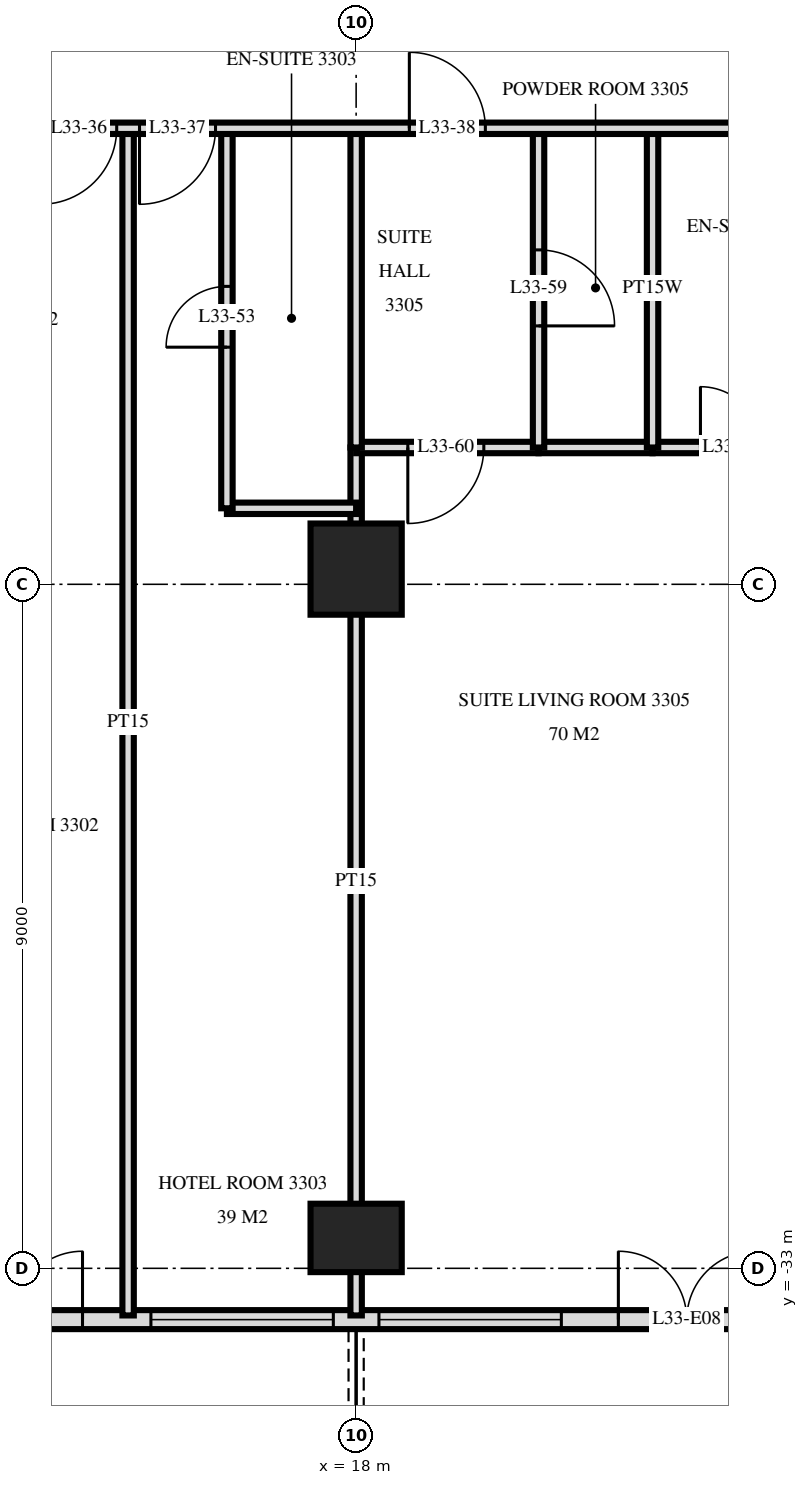
"""IFC4 building model, lengths in metres.
Left out: names, types, materials, properties, quantities, classifications, styles, units other than length and angle.
Written with IfcOpenShell. Run it as: python <this file> out.ifc"""

import sys

from ifc_helpers import new_model, si_unit, direction, frame, frame_2d, origin, origin_2d, place, context, subcontext, project, spatial, rectangle, extrude, element, fill, save


model = new_model("IFC4")
c1 = context("Model", 3, precision=1e-05, world=origin(), true_north=direction((0.0, 1.0)))
c2 = subcontext(c1, "Body", "Model", "MODEL_VIEW")
j1 = project(units=[si_unit("LENGTHUNIT", "METRE"), si_unit("PLANEANGLEUNIT", "RADIAN")], contexts=[c1])
p1 = place(None, origin())
s1 = spatial("IfcSite", under=j1, at=p1, CompositionType="ELEMENT")
p2 = place(p1, origin())
s2 = spatial("IfcBuilding", under=s1, at=p2, CompositionType="ELEMENT")
p3 = place(p2, frame((0.0, 0.0, 130.8)))
s3 = spatial("IfcBuildingStorey", under=s2, at=p3, CompositionType="ELEMENT", Elevation=130.8)
p4 = place(p3, frame((18.0, -32.6, 0.0), z_axis=(0.0, 0.0, 1.0), x_axis=(1.0, 0.0, 0.0)))
e1 = element("IfcColumn", 1, at=p4, inside=s3, PredefinedType="COLUMN", context=c2, shape_type="SweptSolid", body=[
    extrude(rectangle(XDim=1.2, YDim=0.9, at=origin_2d()), origin(), (0.0, 0.0, 1.0), 3.6),
])
p5 = place(p3, frame((18.0, -23.8, 0.0), z_axis=(0.0, 0.0, 1.0), x_axis=(1.0, 0.0, 0.0)))
e2 = element("IfcColumn", 2, at=p5, inside=s3, PredefinedType="COLUMN", context=c2, shape_type="SweptSolid", body=[
    extrude(rectangle(XDim=1.2, YDim=1.2, at=origin_2d()), origin(), (0.0, 0.0, 1.0), 3.6),
])
p6 = place(p3, frame((-23.675, -33.675, 0.0), z_axis=(0.0, 0.0, 1.0), x_axis=(1.0, 0.0, 0.0)))
e3 = element("IfcWall", 3, at=p6, inside=s3, PredefinedType="SOLIDWALL", context=c2, shape_type="SweptSolid", body=[
    extrude(rectangle(XDim=47.351, YDim=0.25, at=frame_2d((23.675, 0.0))), origin(), (0.0, 0.0, 1.0), 3.32),
])
p7 = place(p6, frame((3.425, 0.0, 0.0)))
e4 = element("IfcOpeningElement", 4, at=p7, cuts=e3, PredefinedType="OPENING", context=c2, shape_type="SweptSolid", body=[
    extrude(rectangle(XDim=1.8, YDim=2.4, at=frame_2d((0.9, 1.2))), frame((0.0, 0.135, 0.0), z_axis=(0.0, -1.0, 0.0), x_axis=(1.0, 0.0, 0.0)), (0.0, 0.0, 1.0), 0.27),
])
p8 = place(p6, frame((6.275, 0.0, 0.0)))
e5 = element("IfcOpeningElement", 5, at=p8, cuts=e3, PredefinedType="OPENING", context=c2, shape_type="SweptSolid", body=[
    extrude(rectangle(XDim=1.8, YDim=2.4, at=frame_2d((0.9, 1.2))), frame((0.0, 0.135, 0.0), z_axis=(0.0, -1.0, 0.0), x_axis=(1.0, 0.0, 0.0)), (0.0, 0.0, 1.0), 0.27),
])
p9 = place(p6, frame((8.975, 0.0, 0.3)))
e6 = element("IfcOpeningElement", 6, at=p9, cuts=e3, PredefinedType="OPENING", context=c2, shape_type="SweptSolid", body=[
    extrude(rectangle(XDim=2.4, YDim=2.1, at=frame_2d((1.2, 1.05))), frame((0.0, 0.135, 0.0), z_axis=(0.0, -1.0, 0.0), x_axis=(1.0, 0.0, 0.0)), (0.0, 0.0, 1.0), 0.27),
])
p10 = place(p6, frame((12.275, 0.0, 0.0)))
e7 = element("IfcOpeningElement", 7, at=p10, cuts=e3, PredefinedType="OPENING", context=c2, shape_type="SweptSolid", body=[
    extrude(rectangle(XDim=1.8, YDim=2.4, at=frame_2d((0.9, 1.2))), frame((0.0, 0.135, 0.0), z_axis=(0.0, -1.0, 0.0), x_axis=(1.0, 0.0, 0.0)), (0.0, 0.0, 1.0), 0.27),
])
p11 = place(p6, frame((14.975, 0.0, 0.3)))
e8 = element("IfcOpeningElement", 8, at=p11, cuts=e3, PredefinedType="OPENING", context=c2, shape_type="SweptSolid", body=[
    extrude(rectangle(XDim=2.4, YDim=2.1, at=frame_2d((1.2, 1.05))), frame((0.0, 0.135, 0.0), z_axis=(0.0, -1.0, 0.0), x_axis=(1.0, 0.0, 0.0)), (0.0, 0.0, 1.0), 0.27),
])
p12 = place(p6, frame((17.975, 0.0, 0.3)))
e9 = element("IfcOpeningElement", 9, at=p12, cuts=e3, PredefinedType="OPENING", context=c2, shape_type="SweptSolid", body=[
    extrude(rectangle(XDim=2.4, YDim=2.1, at=frame_2d((1.2, 1.05))), frame((0.0, 0.135, 0.0), z_axis=(0.0, -1.0, 0.0), x_axis=(1.0, 0.0, 0.0)), (0.0, 0.0, 1.0), 0.27),
])
p13 = place(p6, frame((21.275, 0.0, 0.0)))
e10 = element("IfcOpeningElement", 10, at=p13, cuts=e3, PredefinedType="OPENING", context=c2, shape_type="SweptSolid", body=[
    extrude(rectangle(XDim=1.8, YDim=2.4, at=frame_2d((0.9, 1.2))), frame((0.0, 0.135, 0.0), z_axis=(0.0, -1.0, 0.0), x_axis=(1.0, 0.0, 0.0)), (0.0, 0.0, 1.0), 0.27),
])
p14 = place(p6, frame((24.275, 0.0, 0.0)))
e11 = element("IfcOpeningElement", 11, at=p14, cuts=e3, PredefinedType="OPENING", context=c2, shape_type="SweptSolid", body=[
    extrude(rectangle(XDim=1.8, YDim=2.4, at=frame_2d((0.9, 1.2))), frame((0.0, 0.135, 0.0), z_axis=(0.0, -1.0, 0.0), x_axis=(1.0, 0.0, 0.0)), (0.0, 0.0, 1.0), 0.27),
])
p15 = place(p6, frame((26.975, 0.0, 0.3)))
e12 = element("IfcOpeningElement", 12, at=p15, cuts=e3, PredefinedType="OPENING", context=c2, shape_type="SweptSolid", body=[
    extrude(rectangle(XDim=2.4, YDim=2.1, at=frame_2d((1.2, 1.05))), frame((0.0, 0.135, 0.0), z_axis=(0.0, -1.0, 0.0), x_axis=(1.0, 0.0, 0.0)), (0.0, 0.0, 1.0), 0.27),
])
p16 = place(p6, frame((30.275, 0.0, 0.0)))
e13 = element("IfcOpeningElement", 13, at=p16, cuts=e3, PredefinedType="OPENING", context=c2, shape_type="SweptSolid", body=[
    extrude(rectangle(XDim=1.8, YDim=2.4, at=frame_2d((0.9, 1.2))), frame((0.0, 0.135, 0.0), z_axis=(0.0, -1.0, 0.0), x_axis=(1.0, 0.0, 0.0)), (0.0, 0.0, 1.0), 0.27),
])
p17 = place(p6, frame((32.975, 0.0, 0.3)))
e14 = element("IfcOpeningElement", 14, at=p17, cuts=e3, PredefinedType="OPENING", context=c2, shape_type="SweptSolid", body=[
    extrude(rectangle(XDim=2.4, YDim=2.1, at=frame_2d((1.2, 1.05))), frame((0.0, 0.135, 0.0), z_axis=(0.0, -1.0, 0.0), x_axis=(1.0, 0.0, 0.0)), (0.0, 0.0, 1.0), 0.27),
])
p18 = place(p6, frame((36.275, 0.0, 0.0)))
e15 = element("IfcOpeningElement", 15, at=p18, cuts=e3, PredefinedType="OPENING", context=c2, shape_type="SweptSolid", body=[
    extrude(rectangle(XDim=1.8, YDim=2.4, at=frame_2d((0.9, 1.2))), frame((0.0, 0.135, 0.0), z_axis=(0.0, -1.0, 0.0), x_axis=(1.0, 0.0, 0.0)), (0.0, 0.0, 1.0), 0.27),
])
p19 = place(p6, frame((38.975, 0.0, 0.3)))
e16 = element("IfcOpeningElement", 16, at=p19, cuts=e3, PredefinedType="OPENING", context=c2, shape_type="SweptSolid", body=[
    extrude(rectangle(XDim=2.4, YDim=2.1, at=frame_2d((1.2, 1.05))), frame((0.0, 0.135, 0.0), z_axis=(0.0, -1.0, 0.0), x_axis=(1.0, 0.0, 0.0)), (0.0, 0.0, 1.0), 0.27),
])
p20 = place(p6, frame((41.975, 0.0, 0.3)))
e17 = element("IfcOpeningElement", 17, at=p20, cuts=e3, PredefinedType="OPENING", context=c2, shape_type="SweptSolid", body=[
    extrude(rectangle(XDim=2.4, YDim=2.1, at=frame_2d((1.2, 1.05))), frame((0.0, 0.135, 0.0), z_axis=(0.0, -1.0, 0.0), x_axis=(1.0, 0.0, 0.0)), (0.0, 0.0, 1.0), 0.27),
])
p21 = place(p6, frame((45.125, 0.0, 0.0)))
e18 = element("IfcOpeningElement", 18, at=p21, cuts=e3, PredefinedType="OPENING", context=c2, shape_type="SweptSolid", body=[
    extrude(rectangle(XDim=1.8, YDim=2.4, at=frame_2d((0.9, 1.2))), frame((0.0, 0.135, 0.0), z_axis=(0.0, -1.0, 0.0), x_axis=(1.0, 0.0, 0.0)), (0.0, 0.0, 1.0), 0.27),
])
p22 = place(p3, frame((21.9, -22.2, 0.0), z_axis=(0.0, 0.0, 1.0), x_axis=(0.0, 1.0, 0.0)))
e19 = element("IfcWall", 19, at=p22, inside=s3, PredefinedType="PLUMBINGWALL", context=c2, shape_type="SweptSolid", body=[
    extrude(rectangle(XDim=4.2, YDim=0.15, at=frame_2d((2.1, 0.0))), origin(), (0.0, 0.0, 1.0), 3.32),
])
p23 = place(p3, frame((20.4, -22.2, 0.0), z_axis=(0.0, 0.0, 1.0), x_axis=(0.0, 1.0, 0.0)))
e20 = element("IfcWall", 20, at=p23, inside=s3, PredefinedType="PARTITIONING", context=c2, shape_type="SweptSolid", body=[
    extrude(rectangle(XDim=4.2, YDim=0.15, at=frame_2d((2.1, 0.0))), origin(), (0.0, 0.0, 1.0), 3.32),
])
p24 = place(p23, frame((1.6, 0.0, 0.0)))
e21 = element("IfcOpeningElement", 21, at=p24, cuts=e20, PredefinedType="OPENING", context=c2, shape_type="SweptSolid", body=[
    extrude(rectangle(XDim=1.0, YDim=2.1, at=frame_2d((0.5, 1.05))), frame((0.0, 0.085, 0.0), z_axis=(0.0, -1.0, 0.0), x_axis=(1.0, 0.0, 0.0)), (0.0, 0.0, 1.0), 0.17),
])
p25 = place(p3, frame((18.0, -22.2, 0.0), z_axis=(0.0, 0.0, 1.0), x_axis=(0.0, 1.0, 0.0)))
e22 = element("IfcWall", 22, at=p25, inside=s3, PredefinedType="PARTITIONING", context=c2, shape_type="SweptSolid", body=[
    extrude(rectangle(XDim=4.2, YDim=0.15, at=frame_2d((2.1, 0.0))), origin(), (0.0, 0.0, 1.0), 3.32),
])
p26 = place(p3, frame((18.0, -33.62, 0.0), z_axis=(0.0, 0.0, 1.0), x_axis=(0.0, 1.0, 0.0)))
e23 = element("IfcWall", 23, at=p26, inside=s3, PredefinedType="PARTITIONING", context=c2, shape_type="SweptSolid", body=[
    extrude(rectangle(XDim=11.42, YDim=0.15, at=frame_2d((5.71, 0.0))), origin(), (0.0, 0.0, 1.0), 3.32),
])
p27 = place(p3, frame((16.3, -23.0, 0.0), z_axis=(0.0, 0.0, 1.0), x_axis=(0.0, 1.0, 0.0)))
e24 = element("IfcWall", 24, at=p27, inside=s3, PredefinedType="PARTITIONING", context=c2, shape_type="SweptSolid", body=[
    extrude(rectangle(XDim=5.0, YDim=0.15, at=frame_2d((2.5, 0.0))), origin(), (0.0, 0.0, 1.0), 3.32),
])
p28 = place(p27, frame((2.12, 0.0, 0.0)))
e25 = element("IfcOpeningElement", 25, at=p28, cuts=e24, PredefinedType="OPENING", context=c2, shape_type="SweptSolid", body=[
    extrude(rectangle(XDim=0.8, YDim=2.1, at=frame_2d((0.4, 1.05))), frame((0.0, 0.085, 0.0), z_axis=(0.0, -1.0, 0.0), x_axis=(1.0, 0.0, 0.0)), (0.0, 0.0, 1.0), 0.17),
])
p29 = place(p3, frame((15.0, -33.62, 0.0), z_axis=(0.0, 0.0, 1.0), x_axis=(0.0, 1.0, 0.0)))
e26 = element("IfcWall", 26, at=p29, inside=s3, PredefinedType="PARTITIONING", context=c2, shape_type="SweptSolid", body=[
    extrude(rectangle(XDim=15.62, YDim=0.15, at=frame_2d((7.81, 0.0))), origin(), (0.0, 0.0, 1.0), 3.32),
])
p30 = place(p3, frame((16.3, -23.0, 0.0), z_axis=(0.0, 0.0, 1.0), x_axis=(1.0, 0.0, 0.0)))
e27 = element("IfcWall", 27, at=p30, inside=s3, PredefinedType="PARTITIONING", context=c2, shape_type="SweptSolid", body=[
    extrude(rectangle(XDim=1.7, YDim=0.15, at=frame_2d((0.85, 0.0))), origin(), (0.0, 0.0, 1.0), 3.32),
])
p31 = place(p3, frame((18.0, -22.2, 0.0), z_axis=(0.0, 0.0, 1.0), x_axis=(1.0, 0.0, 0.0)))
e28 = element("IfcWall", 28, at=p31, inside=s3, PredefinedType="PARTITIONING", context=c2, shape_type="SweptSolid", body=[
    extrude(rectangle(XDim=2.4, YDim=0.15, at=frame_2d((1.2, 0.0))), origin(), (0.0, 0.0, 1.0), 3.32),
])
p32 = place(p31, frame((0.68, 0.0, 0.0)))
e29 = element("IfcOpeningElement", 29, at=p32, cuts=e28, PredefinedType="OPENING", context=c2, shape_type="SweptSolid", body=[
    extrude(rectangle(XDim=1.0, YDim=2.1, at=frame_2d((0.5, 1.05))), frame((0.0, 0.085, 0.0), z_axis=(0.0, -1.0, 0.0), x_axis=(1.0, 0.0, 0.0)), (0.0, 0.0, 1.0), 0.17),
])
p33 = place(p3, frame((21.9, -22.2, 0.0), z_axis=(0.0, 0.0, 1.0), x_axis=(1.0, 0.0, 0.0)))
e30 = element("IfcWall", 30, at=p33, inside=s3, PredefinedType="PARTITIONING", context=c2, shape_type="SweptSolid", body=[
    extrude(rectangle(XDim=6.12, YDim=0.15, at=frame_2d((3.06, 0.0))), origin(), (0.0, 0.0, 1.0), 3.32),
])
p34 = place(p33, frame((0.63, 0.0, 0.0)))
e31 = element("IfcOpeningElement", 31, at=p34, cuts=e30, PredefinedType="OPENING", context=c2, shape_type="SweptSolid", body=[
    extrude(rectangle(XDim=0.8, YDim=2.1, at=frame_2d((0.4, 1.05))), frame((0.0, 0.085, 0.0), z_axis=(0.0, -1.0, 0.0), x_axis=(1.0, 0.0, 0.0)), (0.0, 0.0, 1.0), 0.17),
])
p35 = place(p33, frame((3.73, 0.0, 0.0)))
e32 = element("IfcOpeningElement", 32, at=p35, cuts=e30, PredefinedType="OPENING", context=c2, shape_type="SweptSolid", body=[
    extrude(rectangle(XDim=0.9, YDim=2.1, at=frame_2d((0.45, 1.05))), frame((0.0, 0.085, 0.0), z_axis=(0.0, -1.0, 0.0), x_axis=(1.0, 0.0, 0.0)), (0.0, 0.0, 1.0), 0.17),
])
p36 = place(p3, frame((20.4, -22.2, 0.0), z_axis=(0.0, 0.0, 1.0), x_axis=(1.0, 0.0, 0.0)))
e33 = element("IfcWall", 33, at=p36, inside=s3, PredefinedType="PLUMBINGWALL", context=c2, shape_type="SweptSolid", body=[
    extrude(rectangle(XDim=1.5, YDim=0.15, at=frame_2d((0.75, 0.0))), origin(), (0.0, 0.0, 1.0), 3.32),
])
p37 = place(p3, frame((-28.02, -18.0, 0.0), z_axis=(0.0, 0.0, 1.0), x_axis=(1.0, 0.0, 0.0)))
e34 = element("IfcWall", 34, at=p37, inside=s3, PredefinedType="PARTITIONING", context=c2, shape_type="SweptSolid", body=[
    extrude(rectangle(XDim=56.04, YDim=0.15, at=frame_2d((28.02, 0.0))), origin(), (0.0, 0.0, 1.0), 3.32),
])
p38 = place(p37, frame((13.17, 0.0, 0.0)))
e35 = element("IfcOpeningElement", 35, at=p38, cuts=e34, PredefinedType="OPENING", context=c2, shape_type="SweptSolid", body=[
    extrude(rectangle(XDim=1.0, YDim=2.1, at=frame_2d((0.5, 1.05))), frame((0.0, 0.085, 0.0), z_axis=(0.0, -1.0, 0.0), x_axis=(1.0, 0.0, 0.0)), (0.0, 0.0, 1.0), 0.17),
])
p39 = place(p37, frame((11.32, 0.0, 0.0)))
e36 = element("IfcOpeningElement", 36, at=p39, cuts=e34, PredefinedType="OPENING", context=c2, shape_type="SweptSolid", body=[
    extrude(rectangle(XDim=1.0, YDim=2.1, at=frame_2d((0.5, 1.05))), frame((0.0, 0.085, 0.0), z_axis=(0.0, -1.0, 0.0), x_axis=(1.0, 0.0, 0.0)), (0.0, 0.0, 1.0), 0.17),
])
p40 = place(p37, frame((41.87, 0.0, 0.0)))
e37 = element("IfcOpeningElement", 37, at=p40, cuts=e34, PredefinedType="OPENING", context=c2, shape_type="SweptSolid", body=[
    extrude(rectangle(XDim=1.0, YDim=2.1, at=frame_2d((0.5, 1.05))), frame((0.0, 0.085, 0.0), z_axis=(0.0, -1.0, 0.0), x_axis=(1.0, 0.0, 0.0)), (0.0, 0.0, 1.0), 0.17),
])
p41 = place(p37, frame((43.17, 0.0, 0.0)))
e38 = element("IfcOpeningElement", 38, at=p41, cuts=e34, PredefinedType="OPENING", context=c2, shape_type="SweptSolid", body=[
    extrude(rectangle(XDim=1.0, YDim=2.1, at=frame_2d((0.5, 1.05))), frame((0.0, 0.085, 0.0), z_axis=(0.0, -1.0, 0.0), x_axis=(1.0, 0.0, 0.0)), (0.0, 0.0, 1.0), 0.17),
])
p42 = place(p37, frame((46.72, 0.0, 0.0)))
e39 = element("IfcOpeningElement", 39, at=p42, cuts=e34, PredefinedType="OPENING", context=c2, shape_type="SweptSolid", body=[
    extrude(rectangle(XDim=1.0, YDim=2.1, at=frame_2d((0.5, 1.05))), frame((0.0, 0.085, 0.0), z_axis=(0.0, -1.0, 0.0), x_axis=(1.0, 0.0, 0.0)), (0.0, 0.0, 1.0), 0.17),
])
p43 = place(p37, frame((21.52, 0.0, 0.0)))
e40 = element("IfcOpeningElement", 40, at=p43, cuts=e34, PredefinedType="OPENING", context=c2, shape_type="SweptSolid", body=[
    extrude(rectangle(XDim=1.0, YDim=2.1, at=frame_2d((0.5, 1.05))), frame((0.0, 0.085, 0.0), z_axis=(0.0, -1.0, 0.0), x_axis=(1.0, 0.0, 0.0)), (0.0, 0.0, 1.0), 0.17),
])
p44 = place(p37, frame((33.52, 0.0, 0.0)))
e41 = element("IfcOpeningElement", 41, at=p44, cuts=e34, PredefinedType="OPENING", context=c2, shape_type="SweptSolid", body=[
    extrude(rectangle(XDim=1.0, YDim=2.1, at=frame_2d((0.5, 1.05))), frame((0.0, 0.085, 0.0), z_axis=(0.0, -1.0, 0.0), x_axis=(1.0, 0.0, 0.0)), (0.0, 0.0, 1.0), 0.17),
])
p45 = place(p18, origin())
e42 = element("IfcDoor", 42, at=p45, inside=s3, OperationType="DOUBLE_DOOR_SINGLE_SWING", PredefinedType="DOOR", context=c2, shape_type="SweptSolid", body=[
    extrude(rectangle(XDim=1.8, YDim=2.4, at=frame_2d((0.9, 1.2))), frame((0.0, 0.025, 0.0), z_axis=(0.0, -1.0, 0.0), x_axis=(1.0, 0.0, 0.0)), (0.0, 0.0, 1.0), 0.05),
])
fill(e15, e42)
p46 = place(p19, origin())
e43 = element("IfcWindow", 43, at=p46, inside=s3, PartitioningType="SINGLE_PANEL", PredefinedType="WINDOW", context=c2, shape_type="SweptSolid", body=[
    extrude(rectangle(XDim=2.4, YDim=2.1, at=frame_2d((1.2, 1.05))), frame((0.0, 0.03, 0.0), z_axis=(0.0, -1.0, 0.0), x_axis=(1.0, 0.0, 0.0)), (0.0, 0.0, 1.0), 0.06),
])
fill(e16, e43)
p47 = place(p20, origin())
e44 = element("IfcWindow", 44, at=p47, inside=s3, PartitioningType="SINGLE_PANEL", PredefinedType="WINDOW", context=c2, shape_type="SweptSolid", body=[
    extrude(rectangle(XDim=2.4, YDim=2.1, at=frame_2d((1.2, 1.05))), frame((0.0, 0.03, 0.0), z_axis=(0.0, -1.0, 0.0), x_axis=(1.0, 0.0, 0.0)), (0.0, 0.0, 1.0), 0.06),
])
fill(e17, e44)
p48 = place(p21, origin())
e45 = element("IfcDoor", 45, at=p48, inside=s3, OperationType="DOUBLE_DOOR_SINGLE_SWING", PredefinedType="DOOR", context=c2, shape_type="SweptSolid", body=[
    extrude(rectangle(XDim=1.8, YDim=2.4, at=frame_2d((0.9, 1.2))), frame((0.0, 0.025, 0.0), z_axis=(0.0, -1.0, 0.0), x_axis=(1.0, 0.0, 0.0)), (0.0, 0.0, 1.0), 0.05),
])
fill(e18, e45)
p49 = place(p40, frame((0.5, 0.0, 0.0), z_axis=(0.0, 0.0, 1.0), x_axis=(-1.0, 0.0, 0.0)))
e46 = element("IfcDoor", 46, at=p49, inside=s3, OperationType="SINGLE_SWING_LEFT", PredefinedType="DOOR", context=c2, shape_type="SweptSolid", body=[
    extrude(rectangle(XDim=1.0, YDim=2.1, at=frame_2d((0.0, 1.05))), frame((0.0, -0.025, 0.0), z_axis=(0.0, 1.0, 0.0), x_axis=(-1.0, 0.0, 0.0)), (0.0, 0.0, 1.0), 0.05),
])
fill(e37, e46)
p50 = place(p41, frame((0.5, 0.0, 0.0), z_axis=(0.0, 0.0, 1.0), x_axis=(-1.0, 0.0, 0.0)))
e47 = element("IfcDoor", 47, at=p50, inside=s3, OperationType="SINGLE_SWING_LEFT", PredefinedType="DOOR", context=c2, shape_type="SweptSolid", body=[
    extrude(rectangle(XDim=1.0, YDim=2.1, at=frame_2d((0.0, 1.05))), frame((0.0, -0.025, 0.0), z_axis=(0.0, 1.0, 0.0), x_axis=(-1.0, 0.0, 0.0)), (0.0, 0.0, 1.0), 0.05),
])
fill(e38, e47)
p51 = place(p42, origin())
e48 = element("IfcDoor", 48, at=p51, inside=s3, OperationType="SINGLE_SWING_RIGHT", PredefinedType="DOOR", context=c2, shape_type="SweptSolid", body=[
    extrude(rectangle(XDim=1.0, YDim=2.1, at=frame_2d((0.5, 1.05))), frame((0.0, 0.025, 0.0), z_axis=(0.0, -1.0, 0.0), x_axis=(1.0, 0.0, 0.0)), (0.0, 0.0, 1.0), 0.05),
])
fill(e39, e48)
p52 = place(p28, origin())
e49 = element("IfcDoor", 49, at=p52, inside=s3, OperationType="SINGLE_SWING_RIGHT", PredefinedType="DOOR", context=c2, shape_type="SweptSolid", body=[
    extrude(rectangle(XDim=0.8, YDim=2.1, at=frame_2d((0.4, 1.05))), frame((0.0, 0.025, 0.0), z_axis=(0.0, -1.0, 0.0), x_axis=(1.0, 0.0, 0.0)), (0.0, 0.0, 1.0), 0.05),
])
fill(e25, e49)
p53 = place(p24, frame((0.5, 0.0, 0.0), z_axis=(0.0, 0.0, 1.0), x_axis=(-1.0, 0.0, 0.0)))
e50 = element("IfcDoor", 50, at=p53, inside=s3, OperationType="SINGLE_SWING_LEFT", PredefinedType="DOOR", context=c2, shape_type="SweptSolid", body=[
    extrude(rectangle(XDim=1.0, YDim=2.1, at=frame_2d((0.0, 1.05))), frame((0.0, -0.025, 0.0), z_axis=(0.0, 1.0, 0.0), x_axis=(-1.0, 0.0, 0.0)), (0.0, 0.0, 1.0), 0.05),
])
fill(e21, e50)
p54 = place(p32, frame((0.5, 0.0, 0.0), z_axis=(0.0, 0.0, 1.0), x_axis=(-1.0, 0.0, 0.0)))
e51 = element("IfcDoor", 51, at=p54, inside=s3, OperationType="SINGLE_SWING_LEFT", PredefinedType="DOOR", context=c2, shape_type="SweptSolid", body=[
    extrude(rectangle(XDim=1.0, YDim=2.1, at=frame_2d((0.0, 1.05))), frame((0.0, -0.025, 0.0), z_axis=(0.0, 1.0, 0.0), x_axis=(-1.0, 0.0, 0.0)), (0.0, 0.0, 1.0), 0.05),
])
fill(e29, e51)
p55 = place(p34, origin())
e52 = element("IfcDoor", 52, at=p55, inside=s3, OperationType="SINGLE_SWING_RIGHT", PredefinedType="DOOR", context=c2, shape_type="SweptSolid", body=[
    extrude(rectangle(XDim=0.8, YDim=2.1, at=frame_2d((0.4, 1.05))), frame((0.0, 0.025, 0.0), z_axis=(0.0, -1.0, 0.0), x_axis=(1.0, 0.0, 0.0)), (0.0, 0.0, 1.0), 0.05),
])
fill(e31, e52)
save(model, sys.argv[1])
